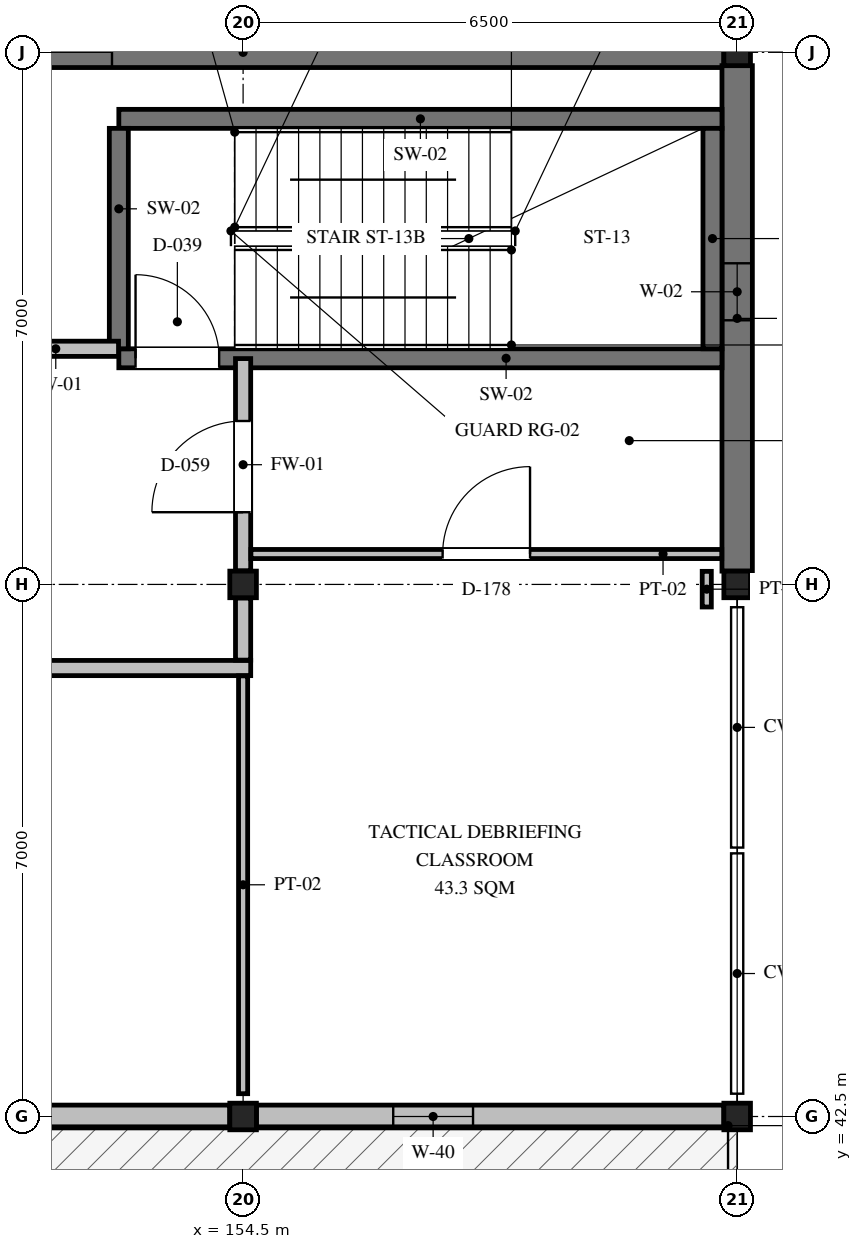
"""IFC4 building model, lengths in metres.
Left out: names, types, materials, properties, quantities, classifications, styles, units other than length and angle.
Written with IfcOpenShell. Run it as: python <this file> out.ifc"""

import sys

from ifc_helpers import new_model, si_unit, direction, frame, frame_2d, origin, origin_2d, place, context, subcontext, project, spatial, rectangle, i_section, extrude, element, fill, save


model = new_model("IFC4")
c1 = context("Model", 3, precision=1e-05, world=origin(), true_north=direction((0.0, 1.0)))
c2 = subcontext(c1, "Body", "Model", "MODEL_VIEW")
j1 = project(units=[si_unit("LENGTHUNIT", "METRE"), si_unit("PLANEANGLEUNIT", "RADIAN")], contexts=[c1])
p1 = place(None, origin())
s1 = spatial("IfcSite", under=j1, at=p1, CompositionType="ELEMENT")
p2 = place(p1, origin())
s2 = spatial("IfcBuilding", under=s1, at=p2, CompositionType="ELEMENT")
p3 = place(p2, frame((0.0, 0.0, 14.25)))
s3 = spatial("IfcBuildingStorey", under=s2, at=p3, CompositionType="ELEMENT", Elevation=14.25)
for number, where, z_axis, x_axis in (
    (1, (154.5, 42.5, 0.0), (0.0, 0.0, 1.0), (1.0, 0.0, 0.0)),
    (2, (154.5, 49.5, 0.0), (0.0, 0.0, 1.0), (1.0, 0.0, 0.0)),
    (3, (161.0, 42.5, 0.0), (0.0, 0.0, 1.0), (1.0, 0.0, 0.0)),
    (4, (161.0, 49.5, 0.0), (0.0, 0.0, 1.0), (1.0, 0.0, 0.0)),
    (5, (161.0, 56.5, 0.0), (0.0, 0.0, 1.0), (1.0, 0.0, 0.0)),
):
    element("IfcColumn", number, at=place(p3, frame(where, z_axis=z_axis, x_axis=x_axis)), inside=s3, PredefinedType="COLUMN", context=c2, shape_type="SweptSolid", body=[
        extrude(i_section(OverallWidth=0.35, OverallDepth=0.35, WebThickness=0.012, FlangeThickness=0.019, FilletRadius=0.02, at=origin_2d()), origin(), (0.0, 0.0, 1.0), 4.2),
    ])
p4 = place(p3, frame((148.175, 56.5, 0.0), z_axis=(0.0, 0.0, 1.0), x_axis=(1.0, 0.0, 0.0)))
e6 = element("IfcWall", 6, at=p4, inside=s3, PredefinedType="SHEAR", context=c2, shape_type="SweptSolid", body=[
    extrude(rectangle(XDim=12.65, YDim=0.4, at=frame_2d((6.325, 0.0))), origin(), (0.0, 0.0, 1.0), 4.0),
])
p5 = place(p4, frame((1.8, 0.0, 0.9)))
e7 = element("IfcOpeningElement", 7, at=p5, cuts=e6, PredefinedType="OPENING", context=c2, shape_type="SweptSolid", body=[
    extrude(rectangle(XDim=2.8, YDim=1.2, at=frame_2d((1.4, 0.6))), frame((0.0, 0.21, 0.0), z_axis=(0.0, -1.0, 0.0), x_axis=(1.0, 0.0, 0.0)), (0.0, 0.0, 1.0), 0.42),
])
p6 = place(p3, frame((161.0, 49.675, 0.0), z_axis=(0.0, 0.0, 1.0), x_axis=(0.0, 1.0, 0.0)))
e8 = element("IfcWall", 8, at=p6, inside=s3, PredefinedType="SHEAR", context=c2, shape_type="SweptSolid", body=[
    extrude(rectangle(XDim=6.65, YDim=0.4, at=frame_2d((3.325, 0.0))), origin(), (0.0, 0.0, 1.0), 4.0),
])
p7 = place(p6, frame((3.3, 0.0, 1.1)))
e9 = element("IfcOpeningElement", 9, at=p7, cuts=e8, PredefinedType="OPENING", context=c2, shape_type="SweptSolid", body=[
    extrude(rectangle(XDim=0.75, YDim=0.75, at=frame_2d((0.375, 0.375))), frame((0.0, 0.21, 0.0), z_axis=(0.0, -1.0, 0.0), x_axis=(1.0, 0.0, 0.0)), (0.0, 0.0, 1.0), 0.42),
])
p8 = place(p3, frame((148.175, 42.5, 0.0), z_axis=(0.0, 0.0, 1.0), x_axis=(1.0, 0.0, 0.0)))
e10 = element("IfcWall", 10, at=p8, inside=s3, PredefinedType="SOLIDWALL", context=c2, shape_type="SweptSolid", body=[
    extrude(rectangle(XDim=6.15, YDim=0.3, at=frame_2d((3.075, 0.0))), origin(), (0.0, 0.0, 1.0), 3.604),
])
p9 = place(p8, frame((1.8, 0.0, 0.9)))
e11 = element("IfcOpeningElement", 11, at=p9, cuts=e10, PredefinedType="OPENING", context=c2, shape_type="SweptSolid", body=[
    extrude(rectangle(XDim=0.8, YDim=1.3, at=frame_2d((0.4, 0.65))), frame((0.0, 0.16, 0.0), z_axis=(0.0, -1.0, 0.0), x_axis=(1.0, 0.0, 0.0)), (0.0, 0.0, 1.0), 0.32),
])
p10 = place(p3, frame((154.675, 42.5, 0.0), z_axis=(0.0, 0.0, 1.0), x_axis=(1.0, 0.0, 0.0)))
e12 = element("IfcWall", 12, at=p10, inside=s3, PredefinedType="SOLIDWALL", context=c2, shape_type="SweptSolid", body=[
    extrude(rectangle(XDim=6.15, YDim=0.3, at=frame_2d((3.075, 0.0))), origin(), (0.0, 0.0, 1.0), 3.494),
])
p11 = place(p10, frame((1.8, 0.0, 0.9)))
e13 = element("IfcOpeningElement", 13, at=p11, cuts=e12, PredefinedType="OPENING", context=c2, shape_type="SweptSolid", body=[
    extrude(rectangle(XDim=1.05, YDim=1.3, at=frame_2d((0.525, 0.65))), frame((0.0, 0.16, 0.0), z_axis=(0.0, -1.0, 0.0), x_axis=(1.0, 0.0, 0.0)), (0.0, 0.0, 1.0), 0.32),
])
p12 = place(p3, frame((152.865, 52.475, 0.0), z_axis=(0.0, 0.0, 1.0), x_axis=(1.0, 0.0, 0.0)))
e14 = element("IfcWall", 14, at=p12, inside=s3, PredefinedType="SHEAR", context=c2, shape_type="SweptSolid", body=[
    extrude(rectangle(XDim=7.935, YDim=0.25, at=frame_2d((3.968, 0.0))), origin(), (0.0, 0.0, 1.0), 4.0),
])
p13 = place(p12, frame((0.22, 0.0, 0.0)))
e15 = element("IfcOpeningElement", 15, at=p13, cuts=e14, PredefinedType="OPENING", context=c2, shape_type="SweptSolid", body=[
    extrude(rectangle(XDim=1.1, YDim=2.15, at=frame_2d((0.55, 1.075))), frame((0.0, 0.135, 0.0), z_axis=(0.0, -1.0, 0.0), x_axis=(1.0, 0.0, 0.0)), (0.0, 0.0, 1.0), 0.27),
])
p14 = place(p3, frame((152.865, 55.625, 0.0), z_axis=(0.0, 0.0, 1.0), x_axis=(1.0, 0.0, 0.0)))
e16 = element("IfcWall", 16, at=p14, inside=s3, PredefinedType="SHEAR", context=c2, shape_type="SweptSolid", body=[
    extrude(rectangle(XDim=7.935, YDim=0.25, at=frame_2d((3.968, 0.0))), origin(), (0.0, 0.0, 1.0), 4.0),
])
for number, where, z_axis, x_axis in (
    (17, (152.865, 52.6, 0.0), (0.0, 0.0, 1.0), (0.0, 1.0, 0.0)),
    (18, (160.675, 52.6, 0.0), (0.0, 0.0, 1.0), (0.0, 1.0, 0.0)),
):
    element("IfcWall", number, at=place(p3, frame(where, z_axis=z_axis, x_axis=x_axis)), inside=s3, PredefinedType="SHEAR", context=c2, shape_type="SweptSolid", body=[
        extrude(rectangle(XDim=2.9, YDim=0.25, at=frame_2d((1.45, 0.0))), origin(), (0.0, 0.0, 1.0), 4.0),
    ])
p15 = place(p3, frame((151.329, 52.6, 0.0), z_axis=(0.0, 0.0, 1.0), x_axis=(1.0, 0.0, 0.0)))
e19 = element("IfcWall", 19, at=p15, inside=s3, PredefinedType="PARTITIONING", context=c2, shape_type="SweptSolid", body=[
    extrude(rectangle(XDim=1.532, YDim=0.2, at=frame_2d((0.766, 0.0))), origin(), (0.0, 0.0, 1.0), 4.0),
])
p16 = place(p3, frame((145.9, 48.4, 0.0), z_axis=(0.0, 0.0, 1.0), x_axis=(1.0, 0.0, 0.0)))
e20 = element("IfcWall", 20, at=p16, inside=s3, PredefinedType="PARTITIONING", context=c2, shape_type="SweptSolid", body=[
    extrude(rectangle(XDim=8.7, YDim=0.2, at=frame_2d((4.35, 0.0))), origin(), (0.0, 0.0, 1.0), 4.0),
])
p17 = place(p16, frame((4.3, 0.0, 0.0)))
e21 = element("IfcOpeningElement", 21, at=p17, cuts=e20, PredefinedType="OPENING", context=c2, shape_type="SweptSolid", body=[
    extrude(rectangle(XDim=1.2, YDim=2.15, at=frame_2d((0.6, 1.075))), frame((0.0, 0.11, 0.0), z_axis=(0.0, -1.0, 0.0), x_axis=(1.0, 0.0, 0.0)), (0.0, 0.0, 1.0), 0.22),
])
p18 = place(p3, frame((154.5, 48.504, 0.0), z_axis=(0.0, 0.0, 1.0), x_axis=(0.0, 1.0, 0.0)))
e22 = element("IfcWall", 22, at=p18, inside=s3, PredefinedType="PARTITIONING", context=c2, shape_type="SweptSolid", body=[
    extrude(rectangle(XDim=0.817, YDim=0.2, at=frame_2d((0.409, 0.0))), origin(), (0.0, 0.0, 1.0), 3.494),
])
p19 = place(p3, frame((154.5, 49.679, 0.0), z_axis=(0.0, 0.0, 1.0), x_axis=(0.0, 1.0, 0.0)))
e23 = element("IfcWall", 23, at=p19, inside=s3, PredefinedType="PARTITIONING", context=c2, shape_type="SweptSolid", body=[
    extrude(rectangle(XDim=2.792, YDim=0.2, at=frame_2d((1.396, 0.0))), origin(), (0.0, 0.0, 1.0), 4.0),
])
p20 = place(p19, frame((0.771, 0.0, 0.0)))
e24 = element("IfcOpeningElement", 24, at=p20, cuts=e23, PredefinedType="OPENING", context=c2, shape_type="SweptSolid", body=[
    extrude(rectangle(XDim=1.2, YDim=2.15, at=frame_2d((0.6, 1.075))), frame((0.0, 0.11, 0.0), z_axis=(0.0, -1.0, 0.0), x_axis=(1.0, 0.0, 0.0)), (0.0, 0.0, 1.0), 0.22),
])
p21 = place(p3, frame((154.603, 49.9, 0.0), z_axis=(0.0, 0.0, 1.0), x_axis=(1.0, 0.0, 0.0)))
e25 = element("IfcWall", 25, at=p21, inside=s3, PredefinedType="PARTITIONING", context=c2, shape_type="SweptSolid", body=[
    extrude(rectangle(XDim=6.194, YDim=0.12, at=frame_2d((3.097, 0.0))), origin(), (0.0, 0.0, 1.0), 4.0),
])
p22 = place(p21, frame((2.522, 0.0, 0.0)))
e26 = element("IfcOpeningElement", 26, at=p22, cuts=e25, PredefinedType="OPENING", context=c2, shape_type="SweptSolid", body=[
    extrude(rectangle(XDim=1.15, YDim=2.1, at=frame_2d((0.575, 1.05))), frame((0.0, 0.07, 0.0), z_axis=(0.0, -1.0, 0.0), x_axis=(1.0, 0.0, 0.0)), (0.0, 0.0, 1.0), 0.14),
])
p23 = place(p3, frame((154.5, 42.8, 0.0), z_axis=(0.0, 0.0, 1.0), x_axis=(0.0, 1.0, 0.0)))
e27 = element("IfcWall", 27, at=p23, inside=s3, PredefinedType="PARTITIONING", context=c2, shape_type="SweptSolid", body=[
    extrude(rectangle(XDim=5.497, YDim=0.12, at=frame_2d((2.749, 0.0))), origin(), (0.0, 0.0, 1.0), 3.494),
])
p24 = place(p3, frame((160.6, 49.203, 0.0), z_axis=(0.0, 0.0, 1.0), x_axis=(0.0, 1.0, 0.0)))
e28 = element("IfcWall", 28, at=p24, inside=s3, PredefinedType="PARTITIONING", context=c2, shape_type="SweptSolid", body=[
    extrude(rectangle(XDim=0.469, YDim=0.12, at=frame_2d((0.235, 0.0))), origin(), (0.0, 0.0, 1.0), 4.0),
])
p25 = place(p5, origin())
e29 = element("IfcWindow", 29, at=p25, inside=s3, PartitioningType="SINGLE_PANEL", PredefinedType="WINDOW", context=c2, shape_type="SweptSolid", body=[
    extrude(rectangle(XDim=2.8, YDim=1.2, at=frame_2d((1.4, 0.6))), frame((0.0, 0.03, 0.0), z_axis=(0.0, -1.0, 0.0), x_axis=(1.0, 0.0, 0.0)), (0.0, 0.0, 1.0), 0.06),
])
fill(e7, e29)
p26 = place(p7, origin())
e30 = element("IfcWindow", 30, at=p26, inside=s3, PartitioningType="SINGLE_PANEL", PredefinedType="WINDOW", context=c2, shape_type="SweptSolid", body=[
    extrude(rectangle(XDim=0.75, YDim=0.75, at=frame_2d((0.375, 0.375))), frame((0.0, 0.03, 0.0), z_axis=(0.0, -1.0, 0.0), x_axis=(1.0, 0.0, 0.0)), (0.0, 0.0, 1.0), 0.06),
])
fill(e9, e30)
p27 = place(p11, origin())
e31 = element("IfcWindow", 31, at=p27, inside=s3, PartitioningType="SINGLE_PANEL", PredefinedType="WINDOW", context=c2, shape_type="SweptSolid", body=[
    extrude(rectangle(XDim=1.05, YDim=1.3, at=frame_2d((0.525, 0.65))), frame((0.0, 0.03, 0.0), z_axis=(0.0, -1.0, 0.0), x_axis=(1.0, 0.0, 0.0)), (0.0, 0.0, 1.0), 0.06),
])
fill(e13, e31)
p28 = place(p13, frame((1.1, 0.0, 0.0), z_axis=(0.0, 0.0, 1.0), x_axis=(-1.0, 0.0, 0.0)))
e32 = element("IfcDoor", 32, at=p28, inside=s3, OperationType="SINGLE_SWING_LEFT", PredefinedType="DOOR", context=c2, shape_type="SweptSolid", body=[
    extrude(rectangle(XDim=1.1, YDim=2.15, at=frame_2d((0.55, 1.075))), frame((0.0, 0.025, 0.0), z_axis=(0.0, -1.0, 0.0), x_axis=(1.0, 0.0, 0.0)), (0.0, 0.0, 1.0), 0.05),
])
fill(e15, e32)
p29 = place(p20, origin())
e33 = element("IfcDoor", 33, at=p29, inside=s3, OperationType="SINGLE_SWING_LEFT", PredefinedType="DOOR", context=c2, shape_type="SweptSolid", body=[
    extrude(rectangle(XDim=1.2, YDim=2.15, at=frame_2d((0.6, 1.075))), frame((0.0, 0.025, 0.0), z_axis=(0.0, -1.0, 0.0), x_axis=(1.0, 0.0, 0.0)), (0.0, 0.0, 1.0), 0.05),
])
fill(e24, e33)
p30 = place(p22, origin())
e34 = element("IfcDoor", 34, at=p30, inside=s3, OperationType="SINGLE_SWING_RIGHT", PredefinedType="DOOR", context=c2, shape_type="SweptSolid", body=[
    extrude(rectangle(XDim=1.15, YDim=2.1, at=frame_2d((0.575, 1.05))), frame((0.0, 0.025, 0.0), z_axis=(0.0, -1.0, 0.0), x_axis=(1.0, 0.0, 0.0)), (0.0, 0.0, 1.0), 0.05),
])
fill(e26, e34)
save(model, sys.argv[1])
